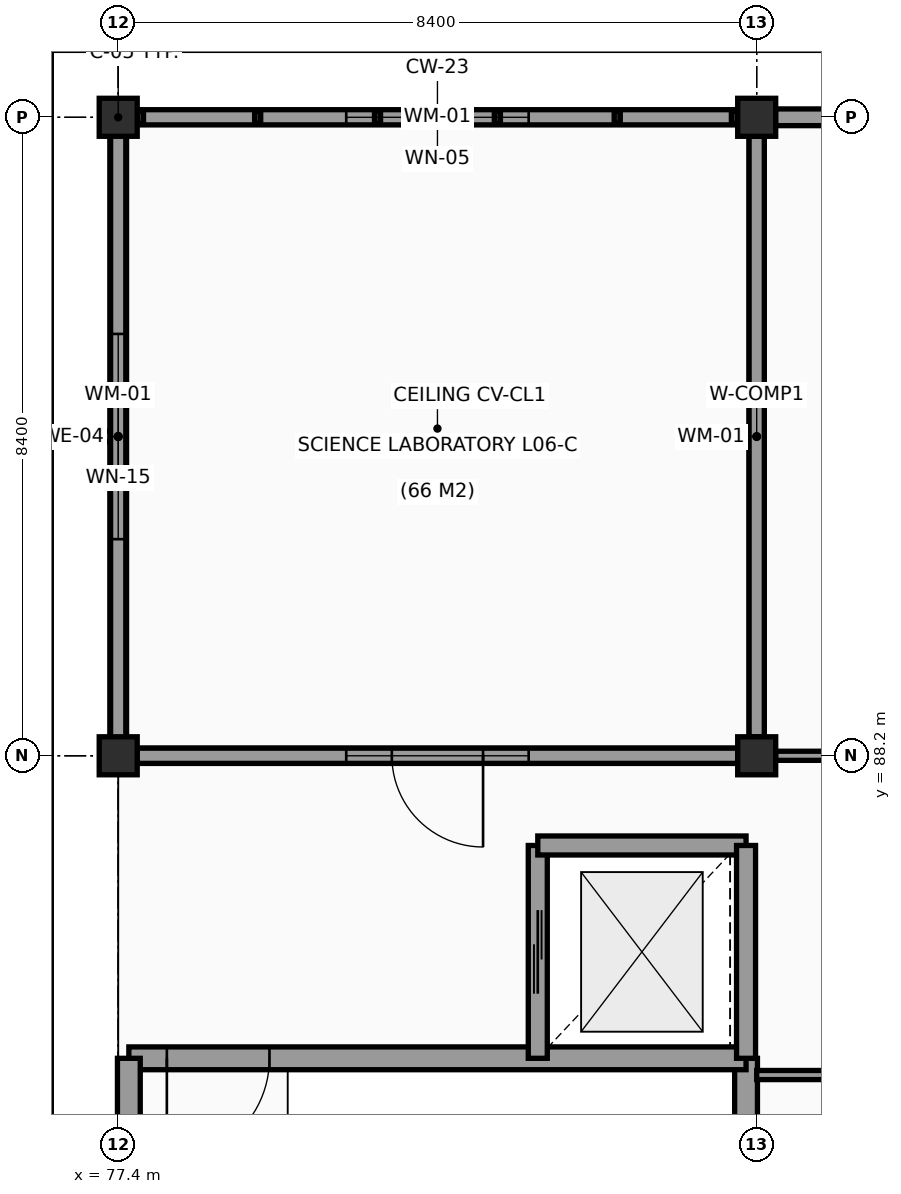
"""IFC4 building model, lengths in metres.
Left out: names, types, materials, properties, quantities, classifications, styles, units other than length and angle.
Written with IfcOpenShell. Run it as: python <this file> out.ifc"""

import sys

from ifc_helpers import new_model, si_unit, direction, frame, frame_2d, origin, origin_2d, place, context, subcontext, project, spatial, rectangle, extrude, element, fill, save


model = new_model("IFC4")
c1 = context("Model", 3, precision=1e-05, world=origin(), true_north=direction((0.0, 1.0)))
c2 = subcontext(c1, "Body", "Model", "MODEL_VIEW")
j1 = project(units=[si_unit("LENGTHUNIT", "METRE"), si_unit("PLANEANGLEUNIT", "RADIAN")], contexts=[c1])
p1 = place(None, origin())
s1 = spatial("IfcSite", under=j1, at=p1, CompositionType="ELEMENT")
p2 = place(p1, origin())
s2 = spatial("IfcBuilding", under=s1, at=p2, CompositionType="ELEMENT")
p3 = place(p2, frame((0.0, 0.0, 22.2)))
s3 = spatial("IfcBuildingStorey", under=s2, at=p3, CompositionType="ELEMENT", Elevation=22.2)
for number, where, z_axis, x_axis in (
    (1, (77.4, 88.2, 0.0), (0.0, 0.0, 1.0), (1.0, 0.0, 0.0)),
    (2, (77.4, 96.6, 0.0), (0.0, 0.0, 1.0), (1.0, 0.0, 0.0)),
    (3, (85.8, 88.2, 0.0), (0.0, 0.0, 1.0), (1.0, 0.0, 0.0)),
    (4, (85.8, 96.6, 0.0), (0.0, 0.0, 1.0), (1.0, 0.0, 0.0)),
):
    element("IfcColumn", number, at=place(p3, frame(where, z_axis=z_axis, x_axis=x_axis)), inside=s3, PredefinedType="COLUMN", context=c2, shape_type="SweptSolid", body=[
        extrude(rectangle(XDim=0.5, YDim=0.5, at=origin_2d()), origin(), (0.0, 0.0, 1.0), 3.38),
    ])
p4 = place(p3, frame((77.4, 88.448, 0.0), z_axis=(0.0, 0.0, 1.0), x_axis=(0.0, 1.0, 0.0)))
e5 = element("IfcWall", 5, at=p4, inside=s3, PredefinedType="SOLIDWALL", context=c2, shape_type="SweptSolid", body=[
    extrude(rectangle(XDim=7.904, YDim=0.22, at=frame_2d((3.952, 0.0))), origin(), (0.0, 0.0, 1.0), 2.68),
])
p5 = place(p4, frame((2.602, 0.0, 0.95)))
e6 = element("IfcOpeningElement", 6, at=p5, cuts=e5, PredefinedType="OPENING", context=c2, shape_type="SweptSolid", body=[
    extrude(rectangle(XDim=2.7, YDim=1.5, at=frame_2d((1.35, 0.75))), frame((0.0, 0.12, 0.0), z_axis=(0.0, -1.0, 0.0), x_axis=(1.0, 0.0, 0.0)), (0.0, 0.0, 1.0), 0.24),
])
p6 = place(p3, frame((86.048, 96.6, 0.0), z_axis=(0.0, 0.0, 1.0), x_axis=(1.0, 0.0, 0.0)))
e7 = element("IfcWall", 7, at=p6, inside=s3, PredefinedType="SOLIDWALL", context=c2, shape_type="SweptSolid", body=[
    extrude(rectangle(XDim=7.904, YDim=0.22, at=frame_2d((3.952, 0.0))), origin(), (0.0, 0.0, 1.0), 2.68),
])
p7 = place(p6, frame((2.452, 0.0, 0.95)))
e8 = element("IfcOpeningElement", 8, at=p7, cuts=e7, PredefinedType="OPENING", context=c2, shape_type="SweptSolid", body=[
    extrude(rectangle(XDim=3.0, YDim=1.5, at=frame_2d((1.5, 0.75))), frame((0.0, 0.12, 0.0), z_axis=(0.0, -1.0, 0.0), x_axis=(1.0, 0.0, 0.0)), (0.0, 0.0, 1.0), 0.24),
])
p8 = place(p3, frame((77.4, 88.2, 3.6), z_axis=(0.0, 0.0, 1.0), x_axis=(1.0, 0.0, 0.0)))
e9 = element("IfcWall", 9, at=p8, inside=s3, PredefinedType="SHEAR", context=c2, shape_type="SweptSolid", body=[
    extrude(rectangle(XDim=8.4, YDim=0.2, at=frame_2d((4.2, 0.0))), origin(), (0.0, 0.0, 1.0), 1.65),
])
p9 = place(p8, frame((3.0, 0.0, 0.25)))
e10 = element("IfcOpeningElement", 10, at=p9, cuts=e9, PredefinedType="OPENING", context=c2, shape_type="SweptSolid", body=[
    extrude(rectangle(XDim=2.4, YDim=1.2, at=frame_2d((1.2, 0.6))), frame((0.0, 0.11, 0.0), z_axis=(0.0, -1.0, 0.0), x_axis=(1.0, 0.0, 0.0)), (0.0, 0.0, 1.0), 0.22),
])
p10 = place(p3, frame((85.8, 88.2, 3.6), z_axis=(0.0, 0.0, 1.0), x_axis=(0.0, 1.0, 0.0)))
e11 = element("IfcWall", 11, at=p10, inside=s3, PredefinedType="SHEAR", context=c2, shape_type="SweptSolid", body=[
    extrude(rectangle(XDim=8.4, YDim=0.2, at=frame_2d((4.2, 0.0))), origin(), (0.0, 0.0, 1.0), 1.65),
])
p11 = place(p3, frame((85.8, 96.6, 3.6), z_axis=(0.0, 0.0, 1.0), x_axis=(-1.0, 0.0, 0.0)))
e12 = element("IfcWall", 12, at=p11, inside=s3, PredefinedType="SHEAR", context=c2, shape_type="SweptSolid", body=[
    extrude(rectangle(XDim=8.4, YDim=0.2, at=frame_2d((4.2, 0.0))), origin(), (0.0, 0.0, 1.0), 1.65),
])
p12 = place(p11, frame((3.0, 0.0, 0.25)))
e13 = element("IfcOpeningElement", 13, at=p12, cuts=e12, PredefinedType="OPENING", context=c2, shape_type="SweptSolid", body=[
    extrude(rectangle(XDim=2.4, YDim=1.2, at=frame_2d((1.2, 0.6))), frame((0.0, 0.11, 0.0), z_axis=(0.0, -1.0, 0.0), x_axis=(1.0, 0.0, 0.0)), (0.0, 0.0, 1.0), 0.22),
])
p13 = place(p3, frame((77.4, 96.6, 3.6), z_axis=(0.0, 0.0, 1.0), x_axis=(0.0, -1.0, 0.0)))
e14 = element("IfcWall", 14, at=p13, inside=s3, PredefinedType="SHEAR", context=c2, shape_type="SweptSolid", body=[
    extrude(rectangle(XDim=8.4, YDim=0.2, at=frame_2d((4.2, 0.0))), origin(), (0.0, 0.0, 1.0), 1.65),
])
p14 = place(p3, frame((85.66, 79.94, 0.0), z_axis=(0.0, 0.0, 1.0), x_axis=(0.0, 1.0, 0.0)))
e15 = element("IfcWall", 15, at=p14, inside=s3, PredefinedType="SHEAR", context=c2, shape_type="SweptSolid", body=[
    extrude(rectangle(XDim=4.28, YDim=0.3, at=frame_2d((2.14, 0.0))), origin(), (0.0, 0.0, 1.0), 3.38),
])
p15 = place(p3, frame((85.66, 84.22, 0.0), z_axis=(0.0, 0.0, 1.0), x_axis=(-1.0, 0.0, 0.0)))
e16 = element("IfcWall", 16, at=p15, inside=s3, PredefinedType="SHEAR", context=c2, shape_type="SweptSolid", body=[
    extrude(rectangle(XDim=8.12, YDim=0.3, at=frame_2d((4.06, 0.0))), origin(), (0.0, 0.0, 1.0), 3.38),
])
p16 = place(p15, frame((6.27, 0.0, 0.0)))
e17 = element("IfcOpeningElement", 17, at=p16, cuts=e16, PredefinedType="OPENING", context=c2, shape_type="SweptSolid", body=[
    extrude(rectangle(XDim=1.35, YDim=2.15, at=frame_2d((0.675, 1.075))), frame((0.0, 0.16, 0.0), z_axis=(0.0, -1.0, 0.0), x_axis=(1.0, 0.0, 0.0)), (0.0, 0.0, 1.0), 0.32),
])
p17 = place(p3, frame((77.54, 84.22, 0.0), z_axis=(0.0, 0.0, 1.0), x_axis=(0.0, -1.0, 0.0)))
e18 = element("IfcWall", 18, at=p17, inside=s3, PredefinedType="SHEAR", context=c2, shape_type="SweptSolid", body=[
    extrude(rectangle(XDim=4.28, YDim=0.3, at=frame_2d((2.14, 0.0))), origin(), (0.0, 0.0, 1.0), 3.38),
])
p18 = place(p3, frame((82.92, 87.02, 0.0), z_axis=(0.0, 0.0, 1.0), x_axis=(0.0, -1.0, 0.0)))
e19 = element("IfcWall", 19, at=p18, inside=s3, PredefinedType="SHEAR", context=c2, shape_type="SweptSolid", body=[
    extrude(rectangle(XDim=2.8, YDim=0.25, at=frame_2d((1.4, 0.0))), origin(), (0.0, 0.0, 1.0), 3.38),
])
p19 = place(p18, frame((0.85, 0.0, 0.0)))
e20 = element("IfcOpeningElement", 20, at=p19, cuts=e19, PredefinedType="OPENING", context=c2, shape_type="SweptSolid", body=[
    extrude(rectangle(XDim=1.1, YDim=2.15, at=frame_2d((0.55, 1.075))), frame((0.0, 0.135, 0.0), z_axis=(0.0, -1.0, 0.0), x_axis=(1.0, 0.0, 0.0)), (0.0, 0.0, 1.0), 0.27),
])
p20 = place(p3, frame((85.66, 87.02, 0.0), z_axis=(0.0, 0.0, 1.0), x_axis=(-1.0, 0.0, 0.0)))
e21 = element("IfcWall", 21, at=p20, inside=s3, PredefinedType="SHEAR", context=c2, shape_type="SweptSolid", body=[
    extrude(rectangle(XDim=2.74, YDim=0.25, at=frame_2d((1.37, 0.0))), origin(), (0.0, 0.0, 1.0), 3.38),
])
p21 = place(p3, frame((85.66, 84.22, 0.0), z_axis=(0.0, 0.0, 1.0), x_axis=(0.0, 1.0, 0.0)))
e22 = element("IfcWall", 22, at=p21, inside=s3, PredefinedType="SHEAR", context=c2, shape_type="SweptSolid", body=[
    extrude(rectangle(XDim=2.8, YDim=0.25, at=frame_2d((1.4, 0.0))), origin(), (0.0, 0.0, 1.0), 3.38),
])
p22 = place(p3, frame((85.8, 84.0, 0.0), z_axis=(0.0, 0.0, 1.0), x_axis=(1.0, 0.0, 0.0)))
e23 = element("IfcWall", 23, at=p22, inside=s3, PredefinedType="PARTITIONING", context=c2, shape_type="SweptSolid", body=[
    extrude(rectangle(XDim=4.2, YDim=0.12, at=frame_2d((2.1, 0.0))), origin(), (0.0, 0.0, 1.0), 3.02),
])
p23 = place(p3, frame((85.8, 96.352, 0.0), z_axis=(0.0, 0.0, 1.0), x_axis=(0.0, -1.0, 0.0)))
e24 = element("IfcWall", 24, at=p23, inside=s3, PredefinedType="PARTITIONING", context=c2, shape_type="SweptSolid", body=[
    extrude(rectangle(XDim=7.904, YDim=0.2, at=frame_2d((3.952, 0.0))), origin(), (0.0, 0.0, 1.0), 3.02),
])
p24 = place(p3, frame((85.552, 88.2, 0.0), z_axis=(0.0, 0.0, 1.0), x_axis=(-1.0, 0.0, 0.0)))
e25 = element("IfcWall", 25, at=p24, inside=s3, PredefinedType="PARTITIONING", context=c2, shape_type="SweptSolid", body=[
    extrude(rectangle(XDim=7.904, YDim=0.2, at=frame_2d((3.952, 0.0))), origin(), (0.0, 0.0, 1.0), 2.99),
])
p25 = place(p24, frame((3.352, 0.0, 0.0)))
e26 = element("IfcOpeningElement", 26, at=p25, cuts=e25, PredefinedType="OPENING", context=c2, shape_type="SweptSolid", body=[
    extrude(rectangle(XDim=1.2, YDim=2.15, at=frame_2d((0.6, 1.075))), frame((0.0, 0.11, 0.0), z_axis=(0.0, -1.0, 0.0), x_axis=(1.0, 0.0, 0.0)), (0.0, 0.0, 1.0), 0.22),
])
p26 = place(p3, frame((93.952, 88.2, 0.0), z_axis=(0.0, 0.0, 1.0), x_axis=(-1.0, 0.0, 0.0)))
e27 = element("IfcWall", 27, at=p26, inside=s3, PredefinedType="PARTITIONING", context=c2, shape_type="SweptSolid", body=[
    extrude(rectangle(XDim=7.904, YDim=0.12, at=frame_2d((3.952, 0.0))), origin(), (0.0, 0.0, 1.0), 2.99),
])
p27 = place(p5, origin())
e28 = element("IfcWindow", 28, at=p27, inside=s3, PartitioningType="SINGLE_PANEL", PredefinedType="WINDOW", context=c2, shape_type="SweptSolid", body=[
    extrude(rectangle(XDim=2.7, YDim=1.5, at=frame_2d((1.35, 0.75))), frame((0.0, 0.03, 0.0), z_axis=(0.0, -1.0, 0.0), x_axis=(1.0, 0.0, 0.0)), (0.0, 0.0, 1.0), 0.06),
])
fill(e6, e28)
p28 = place(p9, origin())
e29 = element("IfcWindow", 29, at=p28, inside=s3, PartitioningType="SINGLE_PANEL", PredefinedType="WINDOW", context=c2, shape_type="SweptSolid", body=[
    extrude(rectangle(XDim=2.4, YDim=1.2, at=frame_2d((1.2, 0.6))), frame((0.0, 0.03, 0.0), z_axis=(0.0, -1.0, 0.0), x_axis=(1.0, 0.0, 0.0)), (0.0, 0.0, 1.0), 0.06),
])
fill(e10, e29)
p29 = place(p12, origin())
e30 = element("IfcWindow", 30, at=p29, inside=s3, PartitioningType="SINGLE_PANEL", PredefinedType="WINDOW", context=c2, shape_type="SweptSolid", body=[
    extrude(rectangle(XDim=2.4, YDim=1.2, at=frame_2d((1.2, 0.6))), frame((0.0, 0.03, 0.0), z_axis=(0.0, -1.0, 0.0), x_axis=(1.0, 0.0, 0.0)), (0.0, 0.0, 1.0), 0.06),
])
fill(e13, e30)
p30 = place(p16, frame((1.35, 0.0, 0.0), z_axis=(0.0, 0.0, 1.0), x_axis=(-1.0, 0.0, 0.0)))
e31 = element("IfcDoor", 31, at=p30, inside=s3, OperationType="SINGLE_SWING_RIGHT", PredefinedType="DOOR", context=c2, shape_type="SweptSolid", body=[
    extrude(rectangle(XDim=1.35, YDim=2.15, at=frame_2d((0.675, 1.075))), frame((0.0, 0.025, 0.0), z_axis=(0.0, -1.0, 0.0), x_axis=(1.0, 0.0, 0.0)), (0.0, 0.0, 1.0), 0.05),
])
fill(e17, e31)
p31 = place(p19, origin())
e32 = element("IfcDoor", 32, at=p31, inside=s3, OperationType="DOUBLE_DOOR_SLIDING", PredefinedType="DOOR", context=c2, shape_type="SweptSolid", body=[
    extrude(rectangle(XDim=1.1, YDim=2.15, at=frame_2d((0.55, 1.075))), frame((0.0, 0.025, 0.0), z_axis=(0.0, -1.0, 0.0), x_axis=(1.0, 0.0, 0.0)), (0.0, 0.0, 1.0), 0.05),
])
fill(e20, e32)
p32 = place(p25, origin())
e33 = element("IfcDoor", 33, at=p32, inside=s3, OperationType="SINGLE_SWING_LEFT", PredefinedType="DOOR", context=c2, shape_type="SweptSolid", body=[
    extrude(rectangle(XDim=1.2, YDim=2.15, at=frame_2d((0.6, 1.075))), frame((0.0, 0.025, 0.0), z_axis=(0.0, -1.0, 0.0), x_axis=(1.0, 0.0, 0.0)), (0.0, 0.0, 1.0), 0.05),
])
fill(e26, e33)
save(model, sys.argv[1])
